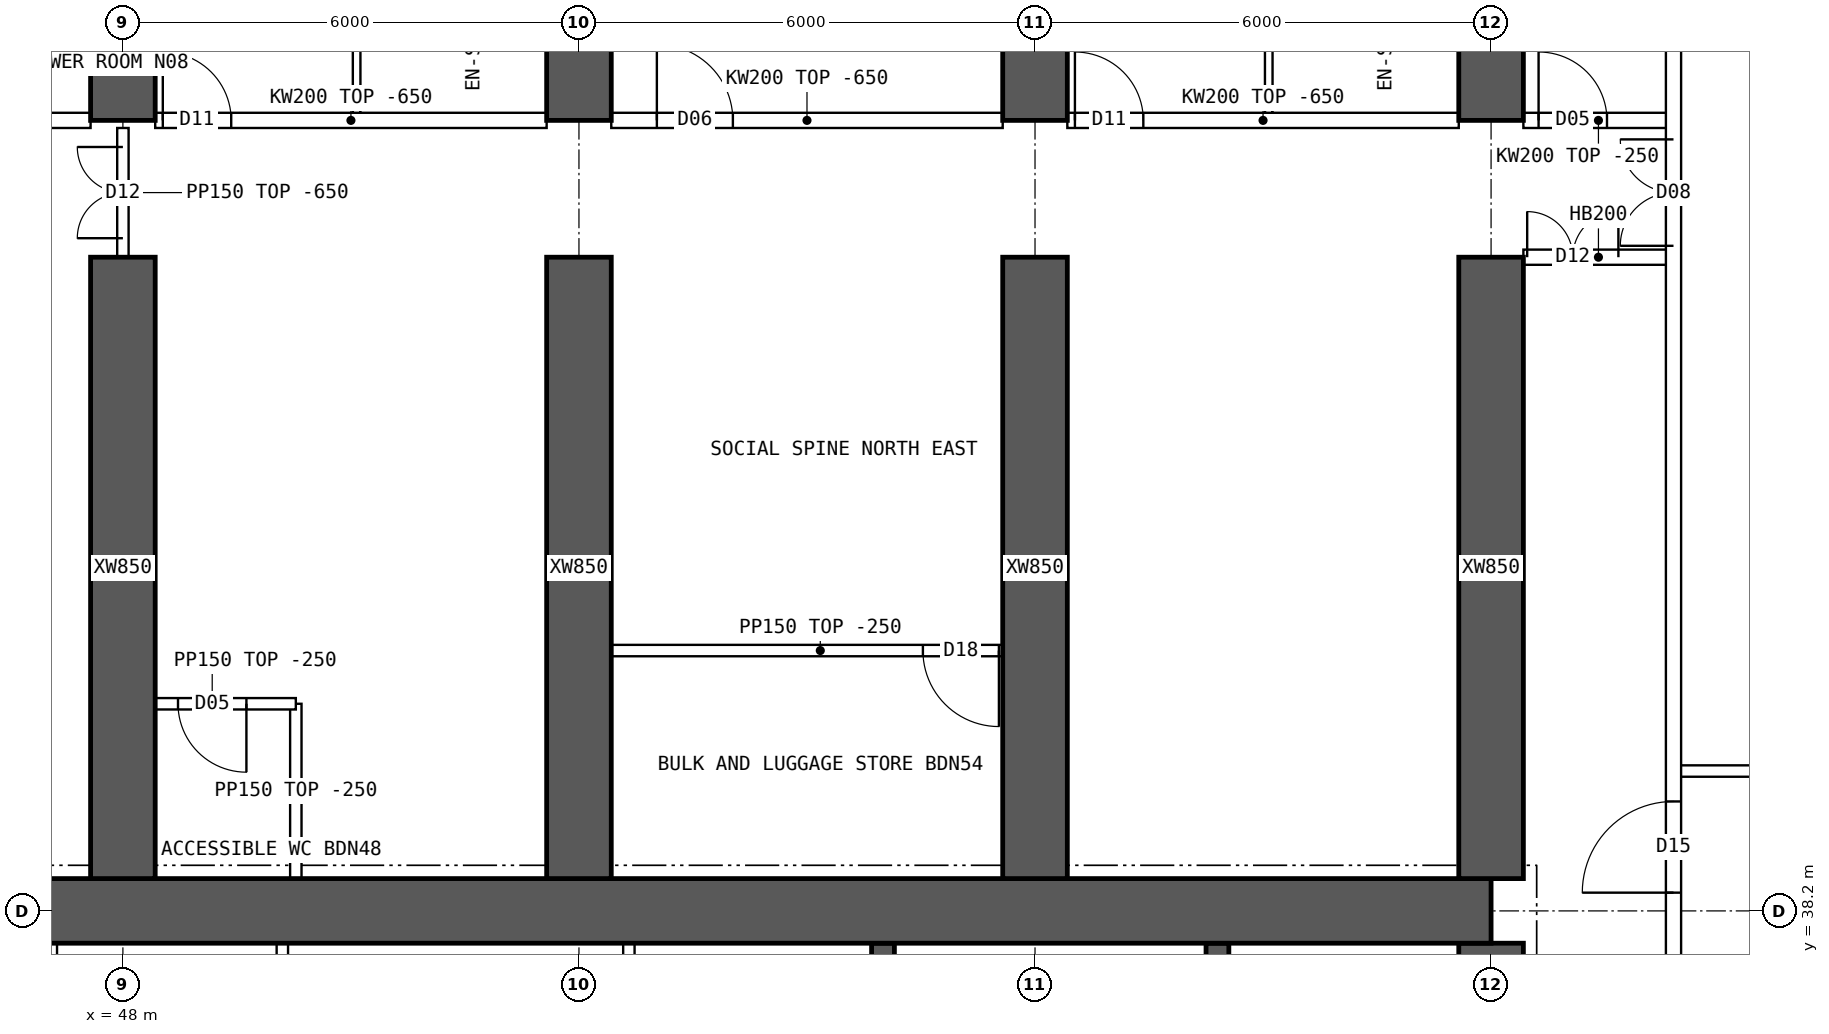
"""IFC4 building model, lengths in metres.
Left out: names, types, materials, properties, quantities, classifications, styles, units other than length and angle.
Written with IfcOpenShell. Run it as: python <this file> out.ifc"""

import sys

from ifc_helpers import new_model, si_unit, direction, frame, frame_2d, origin, place, context, subcontext, project, spatial, polyline, rectangle, outline, extrude, element, fill, save


model = new_model("IFC4")
c1 = context("Model", 3, precision=1e-05, world=origin(), true_north=direction((0.0, 1.0)))
c2 = subcontext(c1, "Body", "Model", "MODEL_VIEW")
j1 = project(units=[si_unit("LENGTHUNIT", "METRE"), si_unit("PLANEANGLEUNIT", "RADIAN")], contexts=[c1])
p1 = place(None, origin())
s1 = spatial("IfcSite", under=j1, at=p1, CompositionType="ELEMENT")
p2 = place(p1, origin())
s2 = spatial("IfcBuilding", under=s1, at=p2, CompositionType="ELEMENT")
p3 = place(p2, frame((0.0, 0.0, 152.35)))
s3 = spatial("IfcBuildingStorey", under=s2, at=p3, CompositionType="ELEMENT", Elevation=152.35)
p4 = place(p3, frame((18.0, 38.2, 0.0), z_axis=(0.0, 0.0, 1.0), x_axis=(1.0, 0.0, 0.0)))
e1 = element("IfcWall", 1, at=p4, inside=s3, PredefinedType="SHEAR", context=c2, shape_type="SweptSolid", body=[
    extrude(rectangle(XDim=48.0, YDim=0.85, at=frame_2d((24.0, 0.0))), origin(), (0.0, 0.0, 1.0), 3.75),
])
p5 = place(p3, frame((66.0, 26.225, 0.0), z_axis=(0.0, 0.0, 1.0), x_axis=(0.0, 1.0, 0.0)))
e2 = element("IfcWall", 2, at=p5, inside=s3, PredefinedType="SHEAR", context=c2, shape_type="SweptSolid", body=[
    extrude(rectangle(XDim=11.55, YDim=0.85, at=frame_2d((5.775, 0.0))), origin(), (0.0, 0.0, 1.0), 3.75),
])
p6 = place(p5, frame((5.075, 0.0, 0.0)))
e3 = element("IfcOpeningElement", 3, at=p6, cuts=e2, PredefinedType="OPENING", context=c2, shape_type="SweptSolid", body=[
    extrude(rectangle(XDim=1.2, YDim=2.1, at=frame_2d((0.6, 1.05))), frame((0.0, 0.435, 0.0), z_axis=(0.0, -1.0, 0.0), x_axis=(1.0, 0.0, 0.0)), (0.0, 0.0, 1.0), 0.87),
])
for number, where, z_axis, x_axis in (
    (4, (62.4, 34.75, 0.0), (0.0, 0.0, 1.0), (0.0, 1.0, 0.0)),
    (5, (58.0, 34.75, 0.0), (0.0, 0.0, 1.0), (0.0, 1.0, 0.0)),
):
    element("IfcWall", number, at=place(p3, frame(where, z_axis=z_axis, x_axis=x_axis)), inside=s3, PredefinedType="SHEAR", context=c2, shape_type="SweptSolid", body=[
        extrude(rectangle(XDim=3.025, YDim=0.3, at=frame_2d((1.512, 0.0))), origin(), (0.0, 0.0, 1.0), 3.75),
    ])
p7 = place(p3, frame((48.0, 48.6, 0.0), z_axis=(0.0, 0.0, 1.0), x_axis=(0.0, 1.0, 0.0)))
e6 = element("IfcWall", 6, at=p7, inside=s3, PredefinedType="SHEAR", context=c2, shape_type="SweptSolid", body=[
    extrude(rectangle(XDim=5.4, YDim=0.85, at=frame_2d((2.7, 0.0))), origin(), (0.0, 0.0, 1.0), 3.75),
])
p8 = place(p3, frame((48.0, 38.625, 0.0), z_axis=(0.0, 0.0, 1.0), x_axis=(0.0, 1.0, 0.0)))
e7 = element("IfcWall", 7, at=p8, inside=s3, PredefinedType="SHEAR", context=c2, shape_type="SweptSolid", body=[
    extrude(rectangle(XDim=8.175, YDim=0.85, at=frame_2d((4.087, 0.0))), origin(), (0.0, 0.0, 1.0), 3.75),
])
p9 = place(p3, frame((54.0, 48.6, 0.0), z_axis=(0.0, 0.0, 1.0), x_axis=(0.0, 1.0, 0.0)))
e8 = element("IfcWall", 8, at=p9, inside=s3, PredefinedType="SHEAR", context=c2, shape_type="SweptSolid", body=[
    extrude(rectangle(XDim=5.4, YDim=0.85, at=frame_2d((2.7, 0.0))), origin(), (0.0, 0.0, 1.0), 3.75),
])
p10 = place(p3, frame((54.0, 38.625, 0.0), z_axis=(0.0, 0.0, 1.0), x_axis=(0.0, 1.0, 0.0)))
e9 = element("IfcWall", 9, at=p10, inside=s3, PredefinedType="SHEAR", context=c2, shape_type="SweptSolid", body=[
    extrude(rectangle(XDim=8.175, YDim=0.85, at=frame_2d((4.087, 0.0))), origin(), (0.0, 0.0, 1.0), 3.75),
])
p11 = place(p3, frame((60.0, 48.6, 0.0), z_axis=(0.0, 0.0, 1.0), x_axis=(0.0, 1.0, 0.0)))
e10 = element("IfcWall", 10, at=p11, inside=s3, PredefinedType="SHEAR", context=c2, shape_type="SweptSolid", body=[
    extrude(rectangle(XDim=5.4, YDim=0.85, at=frame_2d((2.7, 0.0))), origin(), (0.0, 0.0, 1.0), 3.75),
])
p12 = place(p3, frame((60.0, 38.625, 0.0), z_axis=(0.0, 0.0, 1.0), x_axis=(0.0, 1.0, 0.0)))
e11 = element("IfcWall", 11, at=p12, inside=s3, PredefinedType="SHEAR", context=c2, shape_type="SweptSolid", body=[
    extrude(rectangle(XDim=8.175, YDim=0.85, at=frame_2d((4.087, 0.0))), origin(), (0.0, 0.0, 1.0), 3.75),
])
p13 = place(p3, frame((66.0, 48.6, 0.0), z_axis=(0.0, 0.0, 1.0), x_axis=(0.0, 1.0, 0.0)))
e12 = element("IfcWall", 12, at=p13, inside=s3, PredefinedType="SHEAR", context=c2, shape_type="SweptSolid", body=[
    extrude(rectangle(XDim=5.4, YDim=0.85, at=frame_2d((2.7, 0.0))), origin(), (0.0, 0.0, 1.0), 3.75),
])
p14 = place(p3, frame((66.0, 38.625, 0.0), z_axis=(0.0, 0.0, 1.0), x_axis=(0.0, 1.0, 0.0)))
e13 = element("IfcWall", 13, at=p14, inside=s3, PredefinedType="SHEAR", context=c2, shape_type="SweptSolid", body=[
    extrude(rectangle(XDim=8.175, YDim=0.85, at=frame_2d((4.087, 0.0))), origin(), (0.0, 0.0, 1.0), 3.75),
])
for number, where, z_axis, x_axis in (
    (14, (47.058, 34.75, 0.0), (0.0, 0.0, 1.0), (0.0, 1.0, 0.0)),
    (15, (50.098, 34.75, 0.0), (0.0, 0.0, 1.0), (0.0, 1.0, 0.0)),
    (16, (54.657, 34.75, 0.0), (0.0, 0.0, 1.0), (0.0, 1.0, 0.0)),
):
    element("IfcWall", number, at=place(p3, frame(where, z_axis=z_axis, x_axis=x_axis)), inside=s3, PredefinedType="SOLIDWALL", context=c2, shape_type="SweptSolid", body=[
        extrude(rectangle(XDim=3.025, YDim=0.15, at=frame_2d((1.512, 0.0))), origin(), (0.0, 0.0, 1.0), 3.5),
    ])
p15 = place(p3, frame((42.425, 48.6, 0.0), z_axis=(0.0, 0.0, 1.0), x_axis=(1.0, 0.0, 0.0)))
e17 = element("IfcWall", 17, at=p15, inside=s3, PredefinedType="SOLIDWALL", context=c2, shape_type="SweptSolid", body=[
    extrude(outline(polyline([(0.0, 0.0), (5.15, 0.0), (5.15, 3.1), (0.0, 3.1), (0.0, 0.0)])), frame((0.0, 0.1, 0.0), z_axis=(0.0, -1.0, 0.0), x_axis=(1.0, 0.0, 0.0)), (0.0, 0.0, 1.0), 0.2),
])
p16 = place(p15, frame((2.3, 0.0, 0.0)))
e18 = element("IfcOpeningElement", 18, at=p16, cuts=e17, PredefinedType="OPENING", context=c2, shape_type="SweptSolid", body=[
    extrude(rectangle(XDim=0.9, YDim=2.1, at=frame_2d((0.45, 1.05))), frame((0.0, 0.11, 0.0), z_axis=(0.0, -1.0, 0.0), x_axis=(1.0, 0.0, 0.0)), (0.0, 0.0, 1.0), 0.22),
])
p17 = place(p3, frame((48.425, 48.6, 0.0), z_axis=(0.0, 0.0, 1.0), x_axis=(1.0, 0.0, 0.0)))
e19 = element("IfcWall", 19, at=p17, inside=s3, PredefinedType="SOLIDWALL", context=c2, shape_type="SweptSolid", body=[
    extrude(outline(polyline([(0.0, 0.0), (5.15, 0.0), (5.15, 3.1), (0.0, 3.1), (0.0, 0.0)])), frame((0.0, 0.1, 0.0), z_axis=(0.0, -1.0, 0.0), x_axis=(1.0, 0.0, 0.0)), (0.0, 0.0, 1.0), 0.2),
])
p18 = place(p17, frame((0.1, 0.0, 0.0)))
e20 = element("IfcOpeningElement", 20, at=p18, cuts=e19, PredefinedType="OPENING", context=c2, shape_type="SweptSolid", body=[
    extrude(rectangle(XDim=0.9, YDim=2.1, at=frame_2d((0.45, 1.05))), frame((0.0, 0.11, 0.0), z_axis=(0.0, -1.0, 0.0), x_axis=(1.0, 0.0, 0.0)), (0.0, 0.0, 1.0), 0.22),
])
p19 = place(p3, frame((54.425, 48.6, 0.0), z_axis=(0.0, 0.0, 1.0), x_axis=(1.0, 0.0, 0.0)))
e21 = element("IfcWall", 21, at=p19, inside=s3, PredefinedType="SOLIDWALL", context=c2, shape_type="SweptSolid", body=[
    extrude(outline(polyline([(0.0, 0.0), (5.15, 0.0), (5.15, 3.1), (0.0, 3.1), (0.0, 0.0)])), frame((0.0, 0.1, 0.0), z_axis=(0.0, -1.0, 0.0), x_axis=(1.0, 0.0, 0.0)), (0.0, 0.0, 1.0), 0.2),
])
p20 = place(p19, frame((0.6, 0.0, 0.0)))
e22 = element("IfcOpeningElement", 22, at=p20, cuts=e21, PredefinedType="OPENING", context=c2, shape_type="SweptSolid", body=[
    extrude(rectangle(XDim=1.0, YDim=2.1, at=frame_2d((0.5, 1.05))), frame((0.0, 0.11, 0.0), z_axis=(0.0, -1.0, 0.0), x_axis=(1.0, 0.0, 0.0)), (0.0, 0.0, 1.0), 0.22),
])
p21 = place(p3, frame((60.425, 48.6, 0.0), z_axis=(0.0, 0.0, 1.0), x_axis=(1.0, 0.0, 0.0)))
e23 = element("IfcWall", 23, at=p21, inside=s3, PredefinedType="SOLIDWALL", context=c2, shape_type="SweptSolid", body=[
    extrude(outline(polyline([(0.0, 0.0), (5.15, 0.0), (5.15, 3.1), (0.0, 3.1), (0.0, 0.0)])), frame((0.0, 0.1, 0.0), z_axis=(0.0, -1.0, 0.0), x_axis=(1.0, 0.0, 0.0)), (0.0, 0.0, 1.0), 0.2),
])
p22 = place(p21, frame((0.1, 0.0, 0.0)))
e24 = element("IfcOpeningElement", 24, at=p22, cuts=e23, PredefinedType="OPENING", context=c2, shape_type="SweptSolid", body=[
    extrude(rectangle(XDim=0.9, YDim=2.1, at=frame_2d((0.45, 1.05))), frame((0.0, 0.11, 0.0), z_axis=(0.0, -1.0, 0.0), x_axis=(1.0, 0.0, 0.0)), (0.0, 0.0, 1.0), 0.22),
])
p23 = place(p3, frame((66.425, 48.6, 0.0), z_axis=(0.0, 0.0, 1.0), x_axis=(1.0, 0.0, 0.0)))
e25 = element("IfcWall", 25, at=p23, inside=s3, PredefinedType="SOLIDWALL", context=c2, shape_type="SweptSolid", body=[
    extrude(rectangle(XDim=1.975, YDim=0.2, at=frame_2d((0.987, 0.0))), origin(), (0.0, 0.0, 1.0), 3.5),
])
p24 = place(p23, frame((0.2, 0.0, 0.0)))
e26 = element("IfcOpeningElement", 26, at=p24, cuts=e25, PredefinedType="OPENING", context=c2, shape_type="SweptSolid", body=[
    extrude(rectangle(XDim=0.9, YDim=2.1, at=frame_2d((0.45, 1.05))), frame((0.0, 0.11, 0.0), z_axis=(0.0, -1.0, 0.0), x_axis=(1.0, 0.0, 0.0)), (0.0, 0.0, 1.0), 0.22),
])
p25 = place(p3, frame((66.425, 46.8, 0.0), z_axis=(0.0, 0.0, 1.0), x_axis=(1.0, 0.0, 0.0)))
e27 = element("IfcWall", 27, at=p25, inside=s3, PredefinedType="SOLIDWALL", context=c2, shape_type="SweptSolid", body=[
    extrude(rectangle(XDim=1.975, YDim=0.2, at=frame_2d((0.987, 0.0))), origin(), (0.0, 0.0, 1.0), 3.5),
])
p26 = place(p25, frame((0.05, 0.0, 0.0)))
e28 = element("IfcOpeningElement", 28, at=p26, cuts=e27, PredefinedType="OPENING", context=c2, shape_type="SweptSolid", body=[
    extrude(rectangle(XDim=1.2, YDim=2.1, at=frame_2d((0.6, 1.05))), frame((0.0, 0.11, 0.0), z_axis=(0.0, -1.0, 0.0), x_axis=(1.0, 0.0, 0.0)), (0.0, 0.0, 1.0), 0.22),
])
for number, where, z_axis, x_axis in (
    (29, (51.075, 51.05, 0.0), (0.0, 0.0, 1.0), (0.0, -1.0, 0.0)),
    (30, (63.075, 51.05, 0.0), (0.0, 0.0, 1.0), (0.0, -1.0, 0.0)),
):
    element("IfcWall", number, at=place(p3, frame(where, z_axis=z_axis, x_axis=x_axis)), inside=s3, PredefinedType="PARTITIONING", context=c2, shape_type="SweptSolid", body=[
        extrude(outline(polyline([(0.0, 0.0), (2.35, 0.0), (2.35, 3.1), (2.302, 3.1), (2.3, 3.5), (0.0, 3.5), (0.0, 0.0)])), frame((0.0, 0.05, 0.0), z_axis=(0.0, -1.0, 0.0), x_axis=(1.0, 0.0, 0.0)), (0.0, 0.0, 1.0), 0.1),
    ])
p27 = place(p3, frame((50.275, 40.925, 0.0), z_axis=(0.0, 0.0, 1.0), x_axis=(0.0, -1.0, 0.0)))
e31 = element("IfcWall", 31, at=p27, inside=s3, PredefinedType="PARTITIONING", context=c2, shape_type="SweptSolid", body=[
    extrude(rectangle(XDim=2.3, YDim=0.15, at=frame_2d((1.15, 0.0))), origin(), (0.0, 0.0, 1.0), 3.5),
])
p28 = place(p3, frame((50.275, 40.925, 0.0), z_axis=(0.0, 0.0, 1.0), x_axis=(-1.0, 0.0, 0.0)))
e32 = element("IfcWall", 32, at=p28, inside=s3, PredefinedType="PARTITIONING", context=c2, shape_type="SweptSolid", body=[
    extrude(rectangle(XDim=2.2, YDim=0.15, at=frame_2d((1.1, 0.0))), origin(), (0.0, 0.0, 1.0), 3.5),
])
p29 = place(p28, frame((0.65, 0.0, 0.0)))
e33 = element("IfcOpeningElement", 33, at=p29, cuts=e32, PredefinedType="OPENING", context=c2, shape_type="SweptSolid", body=[
    extrude(rectangle(XDim=0.9, YDim=2.1, at=frame_2d((0.45, 1.05))), frame((0.0, 0.085, 0.0), z_axis=(0.0, -1.0, 0.0), x_axis=(1.0, 0.0, 0.0)), (0.0, 0.0, 1.0), 0.17),
])
p30 = place(p3, frame((59.925, 41.625, 0.0), z_axis=(0.0, 0.0, 1.0), x_axis=(-1.0, 0.0, 0.0)))
e34 = element("IfcWall", 34, at=p30, inside=s3, PredefinedType="PARTITIONING", context=c2, shape_type="SweptSolid", body=[
    extrude(rectangle(XDim=5.5, YDim=0.15, at=frame_2d((2.75, 0.0))), origin(), (0.0, 0.0, 1.0), 3.5),
])
p31 = place(p30, frame((0.4, 0.0, 0.0)))
e35 = element("IfcOpeningElement", 35, at=p31, cuts=e34, PredefinedType="OPENING", context=c2, shape_type="SweptSolid", body=[
    extrude(rectangle(XDim=1.0, YDim=2.1, at=frame_2d((0.5, 1.05))), frame((0.0, 0.085, 0.0), z_axis=(0.0, -1.0, 0.0), x_axis=(1.0, 0.0, 0.0)), (0.0, 0.0, 1.0), 0.17),
])
p32 = place(p3, frame((48.0, 46.8, 0.0), z_axis=(0.0, 0.0, 1.0), x_axis=(0.0, 1.0, 0.0)))
e36 = element("IfcWall", 36, at=p32, inside=s3, PredefinedType="PARTITIONING", context=c2, shape_type="SweptSolid", body=[
    extrude(outline(polyline([(0.0, 0.0), (1.7, 0.0), (1.7, 3.1), (0.0, 3.1), (0.0, 0.0)])), frame((0.0, 0.075, 0.0), z_axis=(0.0, -1.0, 0.0), x_axis=(1.0, 0.0, 0.0)), (0.0, 0.0, 1.0), 0.15),
])
p33 = place(p32, frame((0.25, 0.0, 0.0)))
e37 = element("IfcOpeningElement", 37, at=p33, cuts=e36, PredefinedType="OPENING", context=c2, shape_type="SweptSolid", body=[
    extrude(rectangle(XDim=1.2, YDim=2.1, at=frame_2d((0.6, 1.05))), frame((0.0, 0.085, 0.0), z_axis=(0.0, -1.0, 0.0), x_axis=(1.0, 0.0, 0.0)), (0.0, 0.0, 1.0), 0.17),
])
p34 = place(p3, frame((68.4, 10.446, 0.0), z_axis=(0.0, 0.0, 1.0), x_axis=(0.0, 1.0, 0.0)))
e38 = element("IfcWall", 38, at=p34, inside=s3, PredefinedType="SOLIDWALL", context=c2, shape_type="SweptSolid", body=[
    extrude(rectangle(XDim=43.107, YDim=0.2, at=frame_2d((21.554, 0.0))), origin(), (0.0, 0.0, 1.0), 3.5),
])
p35 = place(p34, frame((27.994, 0.0, 0.0)))
e39 = element("IfcOpeningElement", 39, at=p35, cuts=e38, PredefinedType="OPENING", context=c2, shape_type="SweptSolid", body=[
    extrude(rectangle(XDim=1.2, YDim=2.1, at=frame_2d((0.6, 1.05))), frame((0.0, 0.11, 0.0), z_axis=(0.0, -1.0, 0.0), x_axis=(1.0, 0.0, 0.0)), (0.0, 0.0, 1.0), 0.22),
])
p36 = place(p34, frame((5.104, 0.0, 0.0)))
e40 = element("IfcOpeningElement", 40, at=p36, cuts=e38, PredefinedType="OPENING", context=c2, shape_type="SweptSolid", body=[
    extrude(rectangle(XDim=1.4, YDim=2.1, at=frame_2d((0.7, 1.05))), frame((0.0, 0.11, 0.0), z_axis=(0.0, -1.0, 0.0), x_axis=(1.0, 0.0, 0.0)), (0.0, 0.0, 1.0), 0.22),
])
p37 = place(p34, frame((36.504, 0.0, 0.0)))
e41 = element("IfcOpeningElement", 41, at=p37, cuts=e38, PredefinedType="OPENING", context=c2, shape_type="SweptSolid", body=[
    extrude(rectangle(XDim=1.4, YDim=2.1, at=frame_2d((0.7, 1.05))), frame((0.0, 0.11, 0.0), z_axis=(0.0, -1.0, 0.0), x_axis=(1.0, 0.0, 0.0)), (0.0, 0.0, 1.0), 0.22),
])
p38 = place(p3, frame((68.475, 40.04, 0.0), z_axis=(0.0, 0.0, 1.0), x_axis=(1.0, 0.0, 0.0)))
e42 = element("IfcWall", 42, at=p38, inside=s3, PredefinedType="PARTITIONING", context=c2, shape_type="SweptSolid", body=[
    extrude(rectangle(XDim=6.82, YDim=0.15, at=frame_2d((3.41, 0.0))), origin(), (0.0, 0.0, 1.0), 3.5),
])
p39 = place(p26, origin())
e43 = element("IfcDoor", 43, at=p39, inside=s3, OperationType="DOUBLE_DOOR_SINGLE_SWING", PredefinedType="DOOR", context=c2, shape_type="SweptSolid", body=[
    extrude(rectangle(XDim=1.2, YDim=2.1, at=frame_2d((0.6, 1.05))), frame((0.0, 0.025, 0.0), z_axis=(0.0, -1.0, 0.0), x_axis=(1.0, 0.0, 0.0)), (0.0, 0.0, 1.0), 0.05),
])
fill(e28, e43)
p40 = place(p18, origin())
e44 = element("IfcDoor", 44, at=p40, inside=s3, OperationType="SINGLE_SWING_LEFT", PredefinedType="DOOR", context=c2, shape_type="SweptSolid", body=[
    extrude(rectangle(XDim=0.9, YDim=2.1, at=frame_2d((0.45, 1.05))), frame((0.0, 0.025, 0.0), z_axis=(0.0, -1.0, 0.0), x_axis=(1.0, 0.0, 0.0)), (0.0, 0.0, 1.0), 0.05),
])
fill(e20, e44)
p41 = place(p20, origin())
e45 = element("IfcDoor", 45, at=p41, inside=s3, OperationType="SINGLE_SWING_LEFT", PredefinedType="DOOR", context=c2, shape_type="SweptSolid", body=[
    extrude(rectangle(XDim=1.0, YDim=2.1, at=frame_2d((0.5, 1.05))), frame((0.0, 0.025, 0.0), z_axis=(0.0, -1.0, 0.0), x_axis=(1.0, 0.0, 0.0)), (0.0, 0.0, 1.0), 0.05),
])
fill(e22, e45)
p42 = place(p22, origin())
e46 = element("IfcDoor", 46, at=p42, inside=s3, OperationType="SINGLE_SWING_LEFT", PredefinedType="DOOR", context=c2, shape_type="SweptSolid", body=[
    extrude(rectangle(XDim=0.9, YDim=2.1, at=frame_2d((0.45, 1.05))), frame((0.0, 0.025, 0.0), z_axis=(0.0, -1.0, 0.0), x_axis=(1.0, 0.0, 0.0)), (0.0, 0.0, 1.0), 0.05),
])
fill(e24, e46)
p43 = place(p29, origin())
e47 = element("IfcDoor", 47, at=p43, inside=s3, OperationType="SINGLE_SWING_LEFT", PredefinedType="DOOR", context=c2, shape_type="SweptSolid", body=[
    extrude(rectangle(XDim=0.9, YDim=2.1, at=frame_2d((0.45, 1.05))), frame((0.0, 0.025, 0.0), z_axis=(0.0, -1.0, 0.0), x_axis=(1.0, 0.0, 0.0)), (0.0, 0.0, 1.0), 0.05),
])
fill(e33, e47)
p44 = place(p31, origin())
e48 = element("IfcDoor", 48, at=p44, inside=s3, OperationType="SINGLE_SWING_LEFT", PredefinedType="DOOR", context=c2, shape_type="SweptSolid", body=[
    extrude(rectangle(XDim=1.0, YDim=2.1, at=frame_2d((0.5, 1.05))), frame((0.0, 0.025, 0.0), z_axis=(0.0, -1.0, 0.0), x_axis=(1.0, 0.0, 0.0)), (0.0, 0.0, 1.0), 0.05),
])
fill(e35, e48)
p45 = place(p33, origin())
e49 = element("IfcDoor", 49, at=p45, inside=s3, OperationType="DOUBLE_DOOR_SINGLE_SWING", PredefinedType="DOOR", context=c2, shape_type="SweptSolid", body=[
    extrude(rectangle(XDim=1.2, YDim=2.1, at=frame_2d((0.6, 1.05))), frame((0.0, 0.025, 0.0), z_axis=(0.0, -1.0, 0.0), x_axis=(1.0, 0.0, 0.0)), (0.0, 0.0, 1.0), 0.05),
])
fill(e37, e49)
p46 = place(p35, origin())
e50 = element("IfcDoor", 50, at=p46, inside=s3, OperationType="SINGLE_SWING_LEFT", PredefinedType="DOOR", context=c2, shape_type="SweptSolid", body=[
    extrude(rectangle(XDim=1.2, YDim=2.1, at=frame_2d((0.6, 1.05))), frame((0.0, 0.025, 0.0), z_axis=(0.0, -1.0, 0.0), x_axis=(1.0, 0.0, 0.0)), (0.0, 0.0, 1.0), 0.05),
])
fill(e39, e50)
p47 = place(p37, origin())
e51 = element("IfcDoor", 51, at=p47, inside=s3, OperationType="DOUBLE_DOOR_SINGLE_SWING", PredefinedType="DOOR", context=c2, shape_type="SweptSolid", body=[
    extrude(rectangle(XDim=1.4, YDim=2.1, at=frame_2d((0.7, 1.05))), frame((0.0, 0.025, 0.0), z_axis=(0.0, -1.0, 0.0), x_axis=(1.0, 0.0, 0.0)), (0.0, 0.0, 1.0), 0.05),
])
fill(e41, e51)
p48 = place(p24, origin())
e52 = element("IfcDoor", 52, at=p48, inside=s3, OperationType="SINGLE_SWING_LEFT", PredefinedType="DOOR", context=c2, shape_type="SweptSolid", body=[
    extrude(rectangle(XDim=0.9, YDim=2.1, at=frame_2d((0.45, 1.05))), frame((0.0, 0.025, 0.0), z_axis=(0.0, -1.0, 0.0), x_axis=(1.0, 0.0, 0.0)), (0.0, 0.0, 1.0), 0.05),
])
fill(e26, e52)
save(model, sys.argv[1])
